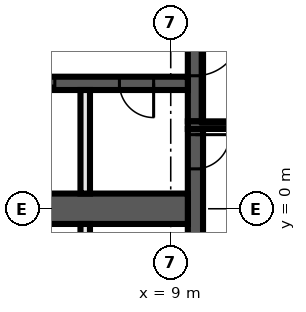
"""IFC4 building model, lengths in metres.
Left out: names, types, materials, properties, quantities, classifications, styles, units other than length and angle.
Written with IfcOpenShell. Run it as: python <this file> out.ifc"""

import sys

from ifc_helpers import new_model, si_unit, direction, frame, frame_2d, origin, place, context, subcontext, project, spatial, rectangle, extrude, element, fill, save


model = new_model("IFC4")
c1 = context("Model", 3, precision=1e-05, world=origin(), true_north=direction((0.0, 1.0)))
c2 = subcontext(c1, "Body", "Model", "MODEL_VIEW")
j1 = project(units=[si_unit("LENGTHUNIT", "METRE"), si_unit("PLANEANGLEUNIT", "RADIAN")], contexts=[c1])
p1 = place(None, origin())
s1 = spatial("IfcSite", under=j1, at=p1, CompositionType="ELEMENT")
p2 = place(p1, origin())
s2 = spatial("IfcBuilding", under=s1, at=p2, CompositionType="ELEMENT")
p3 = place(p2, frame((0.0, 0.0, 139.6)))
s3 = spatial("IfcBuildingStorey", under=s2, at=p3, CompositionType="ELEMENT", Elevation=139.6)
p4 = place(p3, frame((9.65, 2.1, 0.0), z_axis=(0.0, 0.0, 1.0), x_axis=(0.0, -1.0, 0.0)))
e1 = element("IfcWall", 1, at=p4, inside=s3, PredefinedType="SHEAR", context=c2, shape_type="SweptSolid", body=[
    extrude(rectangle(XDim=4.2, YDim=0.4, at=frame_2d((2.1, 0.0))), origin(), (0.0, 0.0, 1.0), 5.4),
])
p5 = place(p4, frame((0.15, 0.0, 0.0)))
e2 = element("IfcOpeningElement", 2, at=p5, cuts=e1, PredefinedType="OPENING", context=c2, shape_type="SweptSolid", body=[
    extrude(rectangle(XDim=0.9, YDim=2.1, at=frame_2d((0.45, 1.05))), frame((0.0, 0.21, 0.0), z_axis=(0.0, -1.0, 0.0), x_axis=(1.0, 0.0, 0.0)), (0.0, 0.0, 1.0), 0.42),
])
p6 = place(p3, frame((9.65, 9.8, 0.0), z_axis=(0.0, 0.0, 1.0), x_axis=(0.0, -1.0, 0.0)))
e3 = element("IfcWall", 3, at=p6, inside=s3, PredefinedType="SHEAR", context=c2, shape_type="SweptSolid", body=[
    extrude(rectangle(XDim=7.5, YDim=0.4, at=frame_2d((3.75, 0.0))), origin(), (0.0, 0.0, 1.0), 5.4),
])
p7 = place(p6, frame((5.1, 0.0, 0.0)))
e4 = element("IfcOpeningElement", 4, at=p7, cuts=e3, PredefinedType="OPENING", context=c2, shape_type="SweptSolid", body=[
    extrude(rectangle(XDim=1.2, YDim=2.1, at=frame_2d((0.6, 1.05))), frame((0.0, 0.21, 0.0), z_axis=(0.0, -1.0, 0.0), x_axis=(1.0, 0.0, 0.0)), (0.0, 0.0, 1.0), 0.42),
])
p8 = place(p3, frame((9.45, 2.2, 0.0), z_axis=(0.0, 0.0, 1.0), x_axis=(1.0, 0.0, 0.0)))
e5 = element("IfcWall", 5, at=p8, inside=s3, PredefinedType="SHEAR", context=c2, shape_type="SweptSolid", body=[
    extrude(rectangle(XDim=3.35, YDim=0.2, at=frame_2d((1.675, 0.0))), origin(), (0.0, 0.0, 1.0), 5.4),
])
p9 = place(p3, frame((9.45, 3.3, 0.0), z_axis=(0.0, 0.0, 1.0), x_axis=(-1.0, 0.0, 0.0)))
e6 = element("IfcWall", 6, at=p9, inside=s3, PredefinedType="SHEAR", context=c2, shape_type="SweptSolid", body=[
    extrude(rectangle(XDim=18.9, YDim=0.35, at=frame_2d((9.45, 0.0))), origin(), (0.0, 0.0, 1.0), 5.4),
])
p10 = place(p9, frame((17.0, 0.0, 0.0)))
e7 = element("IfcOpeningElement", 7, at=p10, cuts=e6, PredefinedType="OPENING", context=c2, shape_type="SweptSolid", body=[
    extrude(rectangle(XDim=1.1, YDim=2.1, at=frame_2d((0.55, 1.05))), frame((0.0, 0.185, 0.0), z_axis=(0.0, -1.0, 0.0), x_axis=(1.0, 0.0, 0.0)), (0.0, 0.0, 1.0), 0.37),
])
p11 = place(p9, frame((14.3, 0.0, 0.0)))
e8 = element("IfcOpeningElement", 8, at=p11, cuts=e6, PredefinedType="OPENING", context=c2, shape_type="SweptSolid", body=[
    extrude(rectangle(XDim=1.1, YDim=2.1, at=frame_2d((0.55, 1.05))), frame((0.0, 0.185, 0.0), z_axis=(0.0, -1.0, 0.0), x_axis=(1.0, 0.0, 0.0)), (0.0, 0.0, 1.0), 0.37),
])
p12 = place(p9, frame((11.6, 0.0, 0.0)))
e9 = element("IfcOpeningElement", 9, at=p12, cuts=e6, PredefinedType="OPENING", context=c2, shape_type="SweptSolid", body=[
    extrude(rectangle(XDim=1.1, YDim=2.1, at=frame_2d((0.55, 1.05))), frame((0.0, 0.185, 0.0), z_axis=(0.0, -1.0, 0.0), x_axis=(1.0, 0.0, 0.0)), (0.0, 0.0, 1.0), 0.37),
])
p13 = place(p9, frame((8.9, 0.0, 0.0)))
e10 = element("IfcOpeningElement", 10, at=p13, cuts=e6, PredefinedType="OPENING", context=c2, shape_type="SweptSolid", body=[
    extrude(rectangle(XDim=1.1, YDim=2.1, at=frame_2d((0.55, 1.05))), frame((0.0, 0.185, 0.0), z_axis=(0.0, -1.0, 0.0), x_axis=(1.0, 0.0, 0.0)), (0.0, 0.0, 1.0), 0.37),
])
p14 = place(p9, frame((6.2, 0.0, 0.0)))
e11 = element("IfcOpeningElement", 11, at=p14, cuts=e6, PredefinedType="OPENING", context=c2, shape_type="SweptSolid", body=[
    extrude(rectangle(XDim=1.1, YDim=2.1, at=frame_2d((0.55, 1.05))), frame((0.0, 0.185, 0.0), z_axis=(0.0, -1.0, 0.0), x_axis=(1.0, 0.0, 0.0)), (0.0, 0.0, 1.0), 0.37),
])
p15 = place(p9, frame((3.5, 0.0, 0.0)))
e12 = element("IfcOpeningElement", 12, at=p15, cuts=e6, PredefinedType="OPENING", context=c2, shape_type="SweptSolid", body=[
    extrude(rectangle(XDim=1.1, YDim=2.1, at=frame_2d((0.55, 1.05))), frame((0.0, 0.185, 0.0), z_axis=(0.0, -1.0, 0.0), x_axis=(1.0, 0.0, 0.0)), (0.0, 0.0, 1.0), 0.37),
])
p16 = place(p9, frame((0.9, 0.0, 0.0)))
e13 = element("IfcOpeningElement", 13, at=p16, cuts=e6, PredefinedType="OPENING", context=c2, shape_type="SweptSolid", body=[
    extrude(rectangle(XDim=0.9, YDim=2.1, at=frame_2d((0.45, 1.05))), frame((0.0, 0.185, 0.0), z_axis=(0.0, -1.0, 0.0), x_axis=(1.0, 0.0, 0.0)), (0.0, 0.0, 1.0), 0.37),
])
p17 = place(p3, frame((-9.45, 0.0, 0.0), z_axis=(0.0, 0.0, 1.0), x_axis=(1.0, 0.0, 0.0)))
e14 = element("IfcWall", 14, at=p17, inside=s3, PredefinedType="SHEAR", context=c2, shape_type="SweptSolid", body=[
    extrude(rectangle(XDim=18.9, YDim=0.8, at=frame_2d((9.45, 0.0))), origin(), (0.0, 0.0, 1.0), 5.4),
])
for number, where, z_axis, x_axis in (
    (15, (6.75, -3.125, 0.0), (0.0, 0.0, 1.0), (0.0, 1.0, 0.0)),
    (16, (6.75, 0.4, 0.0), (0.0, 0.0, 1.0), (0.0, 1.0, 0.0)),
):
    element("IfcWall", number, at=place(p3, frame(where, z_axis=z_axis, x_axis=x_axis)), inside=s3, PredefinedType="SOLIDWALL", context=c2, shape_type="SweptSolid", body=[
        extrude(rectangle(XDim=2.725, YDim=0.25, at=frame_2d((1.363, 0.0))), origin(), (0.0, 0.0, 1.0), 5.4),
    ])
p18 = place(p5, origin())
e17 = element("IfcDoor", 17, at=p18, inside=s3, OperationType="SINGLE_SWING_RIGHT", PredefinedType="DOOR", context=c2, shape_type="SweptSolid", body=[
    extrude(rectangle(XDim=0.9, YDim=2.1, at=frame_2d((0.45, 1.05))), frame((0.0, 0.025, 0.0), z_axis=(0.0, -1.0, 0.0), x_axis=(1.0, 0.0, 0.0)), (0.0, 0.0, 1.0), 0.05),
])
fill(e2, e17)
p19 = place(p15, origin())
e18 = element("IfcDoor", 18, at=p19, inside=s3, OperationType="DOUBLE_DOOR_SLIDING", PredefinedType="DOOR", context=c2, shape_type="SweptSolid", body=[
    extrude(rectangle(XDim=1.1, YDim=2.1, at=frame_2d((0.55, 1.05))), frame((0.0, 0.025, 0.0), z_axis=(0.0, -1.0, 0.0), x_axis=(1.0, 0.0, 0.0)), (0.0, 0.0, 1.0), 0.05),
])
fill(e12, e18)
p20 = place(p16, origin())
e19 = element("IfcDoor", 19, at=p20, inside=s3, OperationType="SINGLE_SWING_LEFT", PredefinedType="DOOR", context=c2, shape_type="SweptSolid", body=[
    extrude(rectangle(XDim=0.9, YDim=2.1, at=frame_2d((0.45, 1.05))), frame((0.0, 0.025, 0.0), z_axis=(0.0, -1.0, 0.0), x_axis=(1.0, 0.0, 0.0)), (0.0, 0.0, 1.0), 0.05),
])
fill(e13, e19)
p21 = place(p7, origin())
e20 = element("IfcDoor", 20, at=p21, inside=s3, OperationType="SINGLE_SWING_LEFT", PredefinedType="DOOR", context=c2, shape_type="SweptSolid", body=[
    extrude(rectangle(XDim=1.2, YDim=2.1, at=frame_2d((0.6, 1.05))), frame((0.0, 0.025, 0.0), z_axis=(0.0, -1.0, 0.0), x_axis=(1.0, 0.0, 0.0)), (0.0, 0.0, 1.0), 0.05),
])
fill(e4, e20)
save(model, sys.argv[1])
